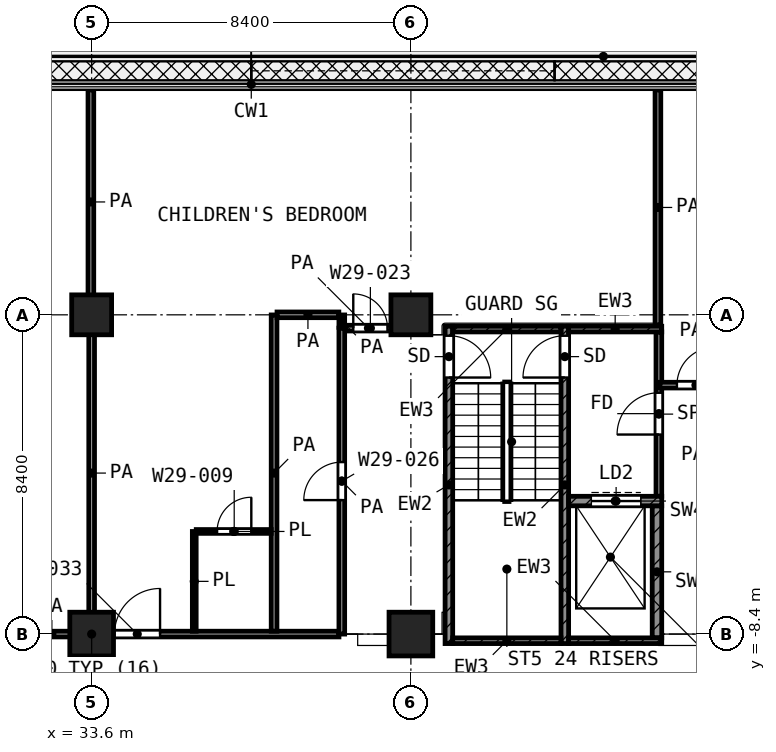
"""IFC4 building model, lengths in metres.
Left out: names, types, materials, properties, quantities, classifications, styles, units other than length and angle.
Written with IfcOpenShell. Run it as: python <this file> out.ifc"""

import sys

from ifc_helpers import new_model, si_unit, direction, frame, frame_2d, origin, origin_2d, place, context, subcontext, project, spatial, rectangle, extrude, element, fill, save


model = new_model("IFC4")
c1 = context("Model", 3, precision=1e-05, world=origin(), true_north=direction((0.0, 1.0)))
c2 = subcontext(c1, "Body", "Model", "MODEL_VIEW")
j1 = project(units=[si_unit("LENGTHUNIT", "METRE"), si_unit("PLANEANGLEUNIT", "RADIAN")], contexts=[c1])
p1 = place(None, origin())
s1 = spatial("IfcSite", under=j1, at=p1, CompositionType="ELEMENT")
p2 = place(p1, origin())
s2 = spatial("IfcBuilding", under=s1, at=p2, CompositionType="ELEMENT")
p3 = place(p2, frame((0.0, 0.0, 149.2)))
s3 = spatial("IfcBuildingStorey", under=s2, at=p3, CompositionType="ELEMENT", Elevation=149.2)
for number, where, z_axis, x_axis in (
    (1, (33.6, 0.0, 0.0), (0.0, 0.0, 1.0), (1.0, 0.0, 0.0)),
    (2, (42.0, 0.0, 0.0), (0.0, 0.0, 1.0), (1.0, 0.0, 0.0)),
):
    element("IfcColumn", number, at=place(p3, frame(where, z_axis=z_axis, x_axis=x_axis)), inside=s3, PredefinedType="COLUMN", context=c2, shape_type="SweptSolid", body=[
        extrude(rectangle(XDim=1.05, YDim=1.05, at=origin_2d()), origin(), (0.0, 0.0, 1.0), 4.2),
    ])
for number, where, z_axis, x_axis in (
    (3, (33.6, -8.4, 0.0), (0.0, 0.0, 1.0), (1.0, 0.0, 0.0)),
    (4, (42.0, -8.4, 0.0), (0.0, 0.0, 1.0), (1.0, 0.0, 0.0)),
):
    element("IfcColumn", number, at=place(p3, frame(where, z_axis=z_axis, x_axis=x_axis)), inside=s3, PredefinedType="COLUMN", context=c2, shape_type="SweptSolid", body=[
        extrude(rectangle(XDim=1.15, YDim=1.15, at=origin_2d()), origin(), (0.0, 0.0, 1.0), 4.2),
    ])
p4 = place(p3, frame((43.0, -8.65, 0.0), z_axis=(0.0, 0.0, 1.0), x_axis=(0.0, 1.0, 0.0)))
e5 = element("IfcWall", 5, at=p4, inside=s3, PredefinedType="SHEAR", context=c2, shape_type="SweptSolid", body=[
    extrude(rectangle(XDim=8.35, YDim=0.2, at=frame_2d((4.175, 0.0))), origin(), (0.0, 0.0, 1.0), 3.7),
])
p5 = place(p4, frame((7.0, 0.0, 0.0)))
e6 = element("IfcOpeningElement", 6, at=p5, cuts=e5, PredefinedType="OPENING", context=c2, shape_type="SweptSolid", body=[
    extrude(rectangle(XDim=1.1, YDim=2.1, at=frame_2d((0.55, 1.05))), frame((0.0, 0.11, 0.0), z_axis=(0.0, -1.0, 0.0), x_axis=(1.0, 0.0, 0.0)), (0.0, 0.0, 1.0), 0.22),
])
p6 = place(p3, frame((46.05, -8.65, 0.0), z_axis=(0.0, 0.0, 1.0), x_axis=(0.0, 1.0, 0.0)))
e7 = element("IfcWall", 7, at=p6, inside=s3, PredefinedType="SHEAR", context=c2, shape_type="SweptSolid", body=[
    extrude(rectangle(XDim=8.35, YDim=0.2, at=frame_2d((4.175, 0.0))), origin(), (0.0, 0.0, 1.0), 3.7),
])
p7 = place(p6, frame((7.0, 0.0, 0.0)))
e8 = element("IfcOpeningElement", 8, at=p7, cuts=e7, PredefinedType="OPENING", context=c2, shape_type="SweptSolid", body=[
    extrude(rectangle(XDim=1.1, YDim=2.1, at=frame_2d((0.55, 1.05))), frame((0.0, 0.11, 0.0), z_axis=(0.0, -1.0, 0.0), x_axis=(1.0, 0.0, 0.0)), (0.0, 0.0, 1.0), 0.22),
])
p8 = place(p3, frame((43.1, -0.375, 0.0), z_axis=(0.0, 0.0, 1.0), x_axis=(1.0, 0.0, 0.0)))
e9 = element("IfcWall", 9, at=p8, inside=s3, PredefinedType="SHEAR", context=c2, shape_type="SweptSolid", body=[
    extrude(rectangle(XDim=2.85, YDim=0.15, at=frame_2d((1.425, 0.0))), origin(), (0.0, 0.0, 1.0), 3.7),
])
p9 = place(p3, frame((46.15, -0.375, 0.0), z_axis=(0.0, 0.0, 1.0), x_axis=(1.0, 0.0, 0.0)))
e10 = element("IfcWall", 10, at=p9, inside=s3, PredefinedType="SHEAR", context=c2, shape_type="SweptSolid", body=[
    extrude(rectangle(XDim=2.45, YDim=0.15, at=frame_2d((1.225, 0.0))), origin(), (0.0, 0.0, 1.0), 3.7),
])
p10 = place(p3, frame((43.1, -8.575, 0.0), z_axis=(0.0, 0.0, 1.0), x_axis=(1.0, 0.0, 0.0)))
e11 = element("IfcWall", 11, at=p10, inside=s3, PredefinedType="SHEAR", context=c2, shape_type="SweptSolid", body=[
    extrude(rectangle(XDim=2.85, YDim=0.15, at=frame_2d((1.425, 0.0))), origin(), (0.0, 0.0, 1.0), 3.7),
])
p11 = place(p3, frame((46.15, -8.575, 0.0), z_axis=(0.0, 0.0, 1.0), x_axis=(1.0, 0.0, 0.0)))
e12 = element("IfcWall", 12, at=p11, inside=s3, PredefinedType="SHEAR", context=c2, shape_type="SweptSolid", body=[
    extrude(rectangle(XDim=2.45, YDim=0.15, at=frame_2d((1.225, 0.0))), origin(), (0.0, 0.0, 1.0), 3.7),
])
p12 = place(p3, frame((46.15, -4.9, 0.0), z_axis=(0.0, 0.0, 1.0), x_axis=(1.0, 0.0, 0.0)))
e13 = element("IfcWall", 13, at=p12, inside=s3, PredefinedType="SHEAR", context=c2, shape_type="SweptSolid", body=[
    extrude(rectangle(XDim=2.45, YDim=0.25, at=frame_2d((1.225, 0.0))), origin(), (0.0, 0.0, 1.0), 3.7),
])
p13 = place(p12, frame((0.6, 0.0, 0.0)))
e14 = element("IfcOpeningElement", 14, at=p13, cuts=e13, PredefinedType="OPENING", context=c2, shape_type="SweptSolid", body=[
    extrude(rectangle(XDim=1.3, YDim=2.1, at=frame_2d((0.65, 1.05))), frame((0.0, 0.135, 0.0), z_axis=(0.0, -1.0, 0.0), x_axis=(1.0, 0.0, 0.0)), (0.0, 0.0, 1.0), 0.27),
])
p14 = place(p3, frame((48.475, -8.5, 0.0), z_axis=(0.0, 0.0, 1.0), x_axis=(0.0, 1.0, 0.0)))
e15 = element("IfcWall", 15, at=p14, inside=s3, PredefinedType="SHEAR", context=c2, shape_type="SweptSolid", body=[
    extrude(rectangle(XDim=3.475, YDim=0.25, at=frame_2d((1.738, 0.0))), origin(), (0.0, 0.0, 1.0), 3.7),
])
p15 = place(p3, frame((48.525, -4.775, 0.0), z_axis=(0.0, 0.0, 1.0), x_axis=(0.0, 1.0, 0.0)))
e16 = element("IfcWall", 16, at=p15, inside=s3, PredefinedType="PARTITIONING", context=c2, shape_type="SweptSolid", body=[
    extrude(rectangle(XDim=4.325, YDim=0.15, at=frame_2d((2.163, 0.0))), origin(), (0.0, 0.0, 1.0), 3.7),
])
p16 = place(p15, frame((1.625, 0.0, 0.0)))
e17 = element("IfcOpeningElement", 17, at=p16, cuts=e16, PredefinedType="OPENING", context=c2, shape_type="SweptSolid", body=[
    extrude(rectangle(XDim=1.1, YDim=2.1, at=frame_2d((0.55, 1.05))), frame((0.0, 0.085, 0.0), z_axis=(0.0, -1.0, 0.0), x_axis=(1.0, 0.0, 0.0)), (0.0, 0.0, 1.0), 0.17),
])
p17 = place(p3, frame((36.352, -5.7, 0.0), z_axis=(0.0, 0.0, 1.0), x_axis=(1.0, 0.0, 0.0)))
e18 = element("IfcWall", 18, at=p17, inside=s3, PredefinedType="PARTITIONING", context=c2, shape_type="SweptSolid", body=[
    extrude(rectangle(XDim=1.973, YDim=0.1, at=frame_2d((0.986, 0.0))), origin(), (0.0, 0.0, 1.0), 3.7),
])
p18 = place(p17, frame((0.549, 0.0, 0.0)))
e19 = element("IfcOpeningElement", 19, at=p18, cuts=e18, PredefinedType="OPENING", context=c2, shape_type="SweptSolid", body=[
    extrude(rectangle(XDim=0.9, YDim=2.1, at=frame_2d((0.45, 1.05))), frame((0.0, 0.06, 0.0), z_axis=(0.0, -1.0, 0.0), x_axis=(1.0, 0.0, 0.0)), (0.0, 0.0, 1.0), 0.12),
])
p19 = place(p3, frame((36.3, -8.325, 0.0), z_axis=(0.0, 0.0, 1.0), x_axis=(0.0, 1.0, 0.0)))
e20 = element("IfcWall", 20, at=p19, inside=s3, PredefinedType="PARTITIONING", context=c2, shape_type="SweptSolid", body=[
    extrude(rectangle(XDim=2.624, YDim=0.1, at=frame_2d((1.312, 0.0))), origin(), (0.0, 0.0, 1.0), 3.7),
])
p20 = place(p3, frame((25.0, -8.4, 0.0), z_axis=(0.0, 0.0, 1.0), x_axis=(1.0, 0.0, 0.0)))
e21 = element("IfcWall", 21, at=p20, inside=s3, PredefinedType="PARTITIONING", context=c2, shape_type="SweptSolid", body=[
    extrude(rectangle(XDim=15.107, YDim=0.15, at=frame_2d((7.553, 0.0))), origin(), (0.0, 0.0, 1.0), 3.7),
])
p21 = place(p20, frame((3.65, 0.0, 0.0)))
e22 = element("IfcOpeningElement", 22, at=p21, cuts=e21, PredefinedType="OPENING", context=c2, shape_type="SweptSolid", body=[
    extrude(rectangle(XDim=1.5, YDim=2.1, at=frame_2d((0.75, 1.05))), frame((0.0, 0.085, 0.0), z_axis=(0.0, -1.0, 0.0), x_axis=(1.0, 0.0, 0.0)), (0.0, 0.0, 1.0), 0.17),
])
p22 = place(p20, frame((9.2, 0.0, 0.0)))
e23 = element("IfcOpeningElement", 23, at=p22, cuts=e21, PredefinedType="OPENING", context=c2, shape_type="SweptSolid", body=[
    extrude(rectangle(XDim=1.2, YDim=2.1, at=frame_2d((0.6, 1.05))), frame((0.0, 0.085, 0.0), z_axis=(0.0, -1.0, 0.0), x_axis=(1.0, 0.0, 0.0)), (0.0, 0.0, 1.0), 0.17),
])
p23 = place(p3, frame((48.55, -1.85, 0.0), z_axis=(0.0, 0.0, 1.0), x_axis=(1.0, 0.0, 0.0)))
e24 = element("IfcWall", 24, at=p23, inside=s3, PredefinedType="PARTITIONING", context=c2, shape_type="SweptSolid", body=[
    extrude(rectangle(XDim=2.297, YDim=0.15, at=frame_2d((1.148, 0.0))), origin(), (0.0, 0.0, 1.0), 3.7),
])
p24 = place(p23, frame((0.45, 0.0, 0.0)))
e25 = element("IfcOpeningElement", 25, at=p24, cuts=e24, PredefinedType="OPENING", context=c2, shape_type="SweptSolid", body=[
    extrude(rectangle(XDim=1.0, YDim=2.1, at=frame_2d((0.5, 1.05))), frame((0.0, 0.085, 0.0), z_axis=(0.0, -1.0, 0.0), x_axis=(1.0, 0.0, 0.0)), (0.0, 0.0, 1.0), 0.17),
])
p25 = place(p3, frame((40.277, -0.35, 0.0), z_axis=(0.0, 0.0, 1.0), x_axis=(1.0, 0.0, 0.0)))
e26 = element("IfcWall", 26, at=p25, inside=s3, PredefinedType="PARTITIONING", context=c2, shape_type="SweptSolid", body=[
    extrude(rectangle(XDim=1.211, YDim=0.15, at=frame_2d((0.605, 0.0))), origin(), (0.0, 0.0, 1.0), 3.7),
])
p26 = place(p25, frame((0.207, 0.0, 0.0)))
e27 = element("IfcOpeningElement", 27, at=p26, cuts=e26, PredefinedType="OPENING", context=c2, shape_type="SweptSolid", body=[
    extrude(rectangle(XDim=0.9, YDim=2.1, at=frame_2d((0.45, 1.05))), frame((0.0, 0.085, 0.0), z_axis=(0.0, -1.0, 0.0), x_axis=(1.0, 0.0, 0.0)), (0.0, 0.0, 1.0), 0.17),
])
p27 = place(p3, frame((38.478, 0.0, 0.0), z_axis=(0.0, 0.0, 1.0), x_axis=(1.0, 0.0, 0.0)))
e28 = element("IfcWall", 28, at=p27, inside=s3, PredefinedType="PARTITIONING", context=c2, shape_type="SweptSolid", body=[
    extrude(rectangle(XDim=1.626, YDim=0.15, at=frame_2d((0.813, 0.0))), origin(), (0.0, 0.0, 1.0), 3.7),
])
p28 = place(p3, frame((33.58, 0.02, 0.0), z_axis=(0.0, 0.0, 1.0), x_axis=(0.0, 1.0, 0.0)))
e29 = element("IfcWall", 29, at=p28, inside=s3, PredefinedType="PARTITIONING", context=c2, shape_type="SweptSolid", body=[
    extrude(rectangle(XDim=5.9, YDim=0.15, at=frame_2d((2.95, 0.0))), origin(), (0.0, 0.0, 1.0), 3.7),
])
for number, where, z_axis, x_axis in (
    (30, (33.6, -8.325, 0.0), (0.0, 0.0, 1.0), (0.0, 1.0, 0.0)),
    (31, (38.4, -8.325, 0.0), (0.0, 0.0, 1.0), (0.0, 1.0, 0.0)),
):
    element("IfcWall", number, at=place(p3, frame(where, z_axis=z_axis, x_axis=x_axis)), inside=s3, PredefinedType="PARTITIONING", context=c2, shape_type="SweptSolid", body=[
        extrude(rectangle(XDim=8.322, YDim=0.15, at=frame_2d((4.161, 0.0))), origin(), (0.0, 0.0, 1.0), 3.7),
    ])
p29 = place(p3, frame((40.182, -8.4, 0.0), z_axis=(0.0, 0.0, 1.0), x_axis=(0.0, 1.0, 0.0)))
e32 = element("IfcWall", 32, at=p29, inside=s3, PredefinedType="PARTITIONING", context=c2, shape_type="SweptSolid", body=[
    extrude(rectangle(XDim=8.05, YDim=0.15, at=frame_2d((4.025, 0.0))), origin(), (0.0, 0.0, 1.0), 3.7),
])
p30 = place(p29, frame((3.525, 0.0, 0.0)))
e33 = element("IfcOpeningElement", 33, at=p30, cuts=e32, PredefinedType="OPENING", context=c2, shape_type="SweptSolid", body=[
    extrude(rectangle(XDim=1.0, YDim=2.1, at=frame_2d((0.5, 1.05))), frame((0.0, 0.085, 0.0), z_axis=(0.0, -1.0, 0.0), x_axis=(1.0, 0.0, 0.0)), (0.0, 0.0, 1.0), 0.17),
])
p31 = place(p3, frame((40.182, -0.33, 0.0), z_axis=(0.0, 0.0, 1.0), x_axis=(0.0, 1.0, 0.0)))
e34 = element("IfcWall", 34, at=p31, inside=s3, PredefinedType="PARTITIONING", context=c2, shape_type="SweptSolid", body=[
    extrude(rectangle(XDim=0.327, YDim=0.15, at=frame_2d((0.164, 0.0))), origin(), (0.0, 0.0, 1.0), 3.7),
])
p32 = place(p3, frame((48.5, -0.27, 0.0), z_axis=(0.0, 0.0, 1.0), x_axis=(0.0, 1.0, 0.0)))
e35 = element("IfcWall", 35, at=p32, inside=s3, PredefinedType="PARTITIONING", context=c2, shape_type="SweptSolid", body=[
    extrude(rectangle(XDim=6.19, YDim=0.15, at=frame_2d((3.095, 0.0))), origin(), (0.0, 0.0, 1.0), 3.7),
])
p33 = place(p5, frame((1.1, 0.0, 0.0), z_axis=(0.0, 0.0, 1.0), x_axis=(-1.0, 0.0, 0.0)))
e36 = element("IfcDoor", 36, at=p33, inside=s3, OperationType="SINGLE_SWING_LEFT", PredefinedType="DOOR", context=c2, shape_type="SweptSolid", body=[
    extrude(rectangle(XDim=1.1, YDim=2.1, at=frame_2d((0.55, 1.05))), frame((0.0, 0.025, 0.0), z_axis=(0.0, -1.0, 0.0), x_axis=(1.0, 0.0, 0.0)), (0.0, 0.0, 1.0), 0.05),
])
fill(e6, e36)
p34 = place(p7, origin())
e37 = element("IfcDoor", 37, at=p34, inside=s3, OperationType="SINGLE_SWING_LEFT", PredefinedType="DOOR", context=c2, shape_type="SweptSolid", body=[
    extrude(rectangle(XDim=1.1, YDim=2.1, at=frame_2d((0.55, 1.05))), frame((0.0, 0.025, 0.0), z_axis=(0.0, -1.0, 0.0), x_axis=(1.0, 0.0, 0.0)), (0.0, 0.0, 1.0), 0.05),
])
fill(e8, e37)
p35 = place(p13, origin())
e38 = element("IfcDoor", 38, at=p35, inside=s3, OperationType="DOUBLE_DOOR_SLIDING", PredefinedType="DOOR", context=c2, shape_type="SweptSolid", body=[
    extrude(rectangle(XDim=1.3, YDim=2.1, at=frame_2d((0.65, 1.05))), frame((0.0, 0.025, 0.0), z_axis=(0.0, -1.0, 0.0), x_axis=(1.0, 0.0, 0.0)), (0.0, 0.0, 1.0), 0.05),
])
fill(e14, e38)
p36 = place(p16, origin())
e39 = element("IfcDoor", 39, at=p36, inside=s3, OperationType="SINGLE_SWING_LEFT", PredefinedType="DOOR", context=c2, shape_type="SweptSolid", body=[
    extrude(rectangle(XDim=1.1, YDim=2.1, at=frame_2d((0.55, 1.05))), frame((0.0, 0.025, 0.0), z_axis=(0.0, -1.0, 0.0), x_axis=(1.0, 0.0, 0.0)), (0.0, 0.0, 1.0), 0.05),
])
fill(e17, e39)
p37 = place(p22, origin())
e40 = element("IfcDoor", 40, at=p37, inside=s3, OperationType="SINGLE_SWING_RIGHT", PredefinedType="DOOR", context=c2, shape_type="SweptSolid", body=[
    extrude(rectangle(XDim=1.2, YDim=2.1, at=frame_2d((0.6, 1.05))), frame((0.0, 0.025, 0.0), z_axis=(0.0, -1.0, 0.0), x_axis=(1.0, 0.0, 0.0)), (0.0, 0.0, 1.0), 0.05),
])
fill(e23, e40)
p38 = place(p26, origin())
e41 = element("IfcDoor", 41, at=p38, inside=s3, OperationType="SINGLE_SWING_LEFT", PredefinedType="DOOR", context=c2, shape_type="SweptSolid", body=[
    extrude(rectangle(XDim=0.9, YDim=2.1, at=frame_2d((0.45, 1.05))), frame((0.0, 0.025, 0.0), z_axis=(0.0, -1.0, 0.0), x_axis=(1.0, 0.0, 0.0)), (0.0, 0.0, 1.0), 0.05),
])
fill(e27, e41)
p39 = place(p18, origin())
e42 = element("IfcDoor", 42, at=p39, inside=s3, OperationType="SINGLE_SWING_RIGHT", PredefinedType="DOOR", context=c2, shape_type="SweptSolid", body=[
    extrude(rectangle(XDim=0.9, YDim=2.1, at=frame_2d((0.45, 1.05))), frame((0.0, 0.025, 0.0), z_axis=(0.0, -1.0, 0.0), x_axis=(1.0, 0.0, 0.0)), (0.0, 0.0, 1.0), 0.05),
])
fill(e19, e42)
p40 = place(p30, origin())
e43 = element("IfcDoor", 43, at=p40, inside=s3, OperationType="SINGLE_SWING_LEFT", PredefinedType="DOOR", context=c2, shape_type="SweptSolid", body=[
    extrude(rectangle(XDim=1.0, YDim=2.1, at=frame_2d((0.5, 1.05))), frame((0.0, 0.025, 0.0), z_axis=(0.0, -1.0, 0.0), x_axis=(1.0, 0.0, 0.0)), (0.0, 0.0, 1.0), 0.05),
])
fill(e33, e43)
p41 = place(p24, origin())
e44 = element("IfcDoor", 44, at=p41, inside=s3, OperationType="SINGLE_SWING_RIGHT", PredefinedType="DOOR", context=c2, shape_type="SweptSolid", body=[
    extrude(rectangle(XDim=1.0, YDim=2.1, at=frame_2d((0.5, 1.05))), frame((0.0, 0.025, 0.0), z_axis=(0.0, -1.0, 0.0), x_axis=(1.0, 0.0, 0.0)), (0.0, 0.0, 1.0), 0.05),
])
fill(e25, e44)
save(model, sys.argv[1])
